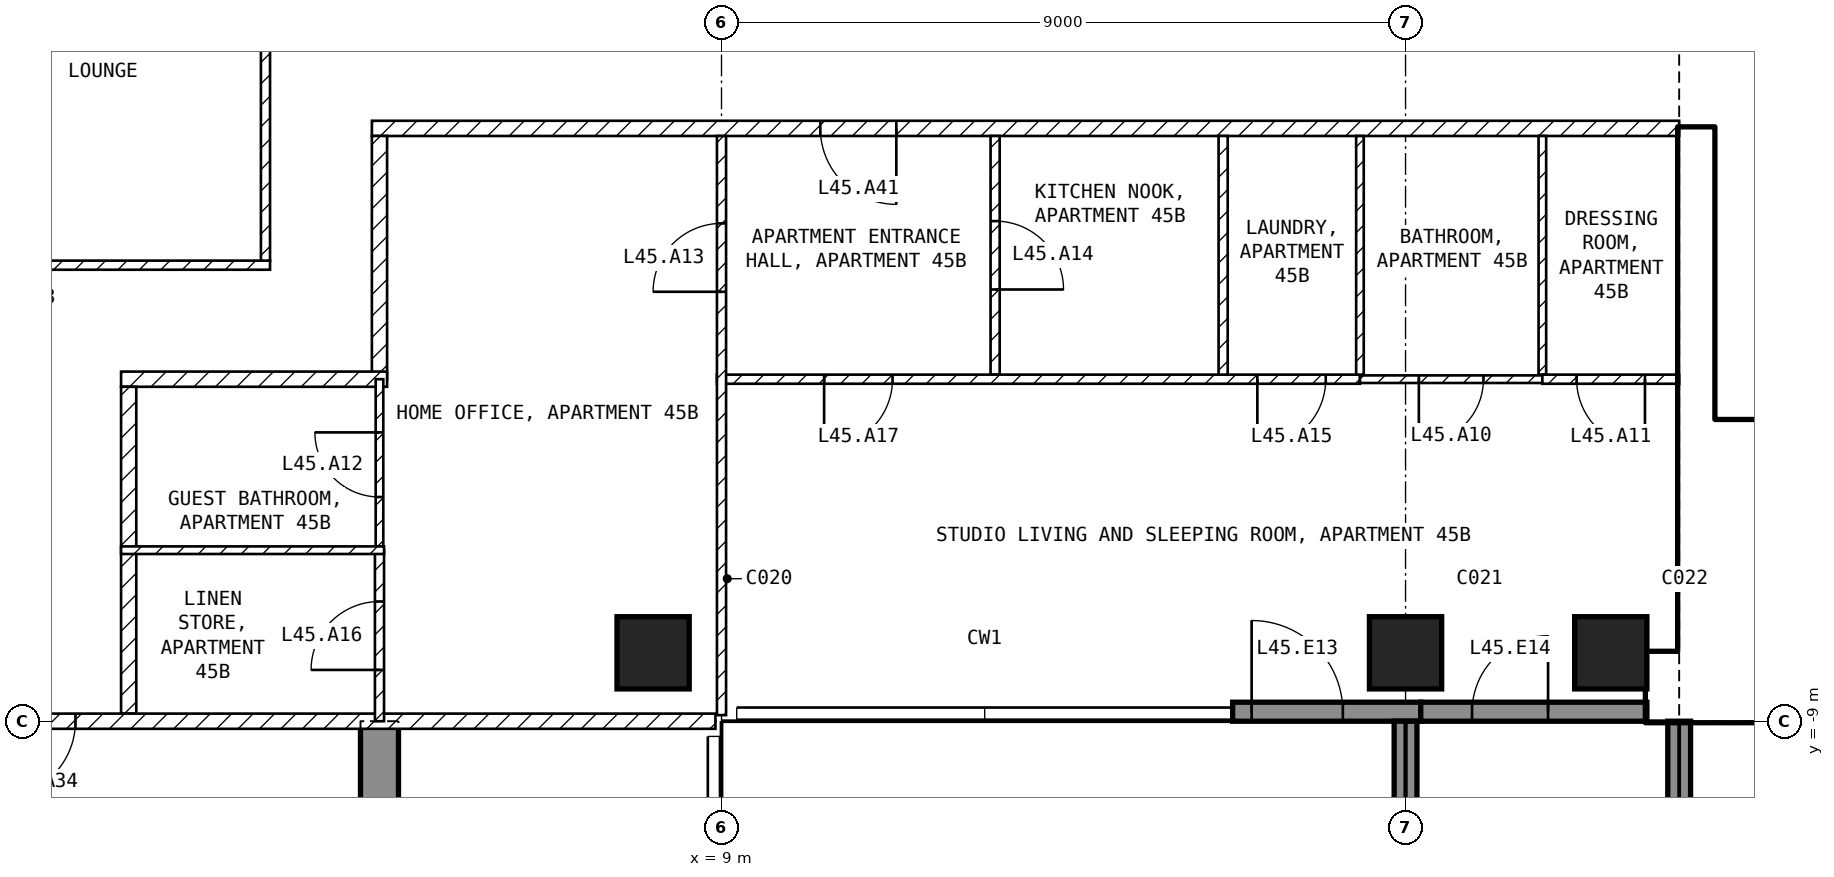
"""IFC4 building model, lengths in metres.
Left out: names, types, materials, properties, quantities, classifications, styles, units other than length and angle.
Written with IfcOpenShell. Run it as: python <this file> out.ifc"""

import sys

from ifc_helpers import new_model, si_unit, direction, frame, frame_2d, origin, origin_2d, place, context, subcontext, project, spatial, polyline, rectangle, outline, extrude, element, fill, save


model = new_model("IFC4")
c1 = context("Model", 3, precision=1e-05, world=origin(), true_north=direction((0.0, 1.0)))
c2 = subcontext(c1, "Body", "Model", "MODEL_VIEW")
j1 = project(units=[si_unit("LENGTHUNIT", "METRE"), si_unit("PLANEANGLEUNIT", "RADIAN")], contexts=[c1])
p1 = place(None, origin())
s1 = spatial("IfcSite", under=j1, at=p1, CompositionType="ELEMENT")
p2 = place(p1, origin())
s2 = spatial("IfcBuilding", under=s1, at=p2, CompositionType="ELEMENT")
p3 = place(p2, frame((0.0, 0.0, 184.1)))
s3 = spatial("IfcBuildingStorey", under=s2, at=p3, CompositionType="ELEMENT", Elevation=184.1)
for number, where, z_axis, x_axis in (
    (1, (8.1, -8.1, -0.25), (0.0, 0.0, 1.0), (1.0, 0.0, 0.0)),
    (2, (18.0, -8.1, -0.25), (0.0, 0.0, 1.0), (1.0, 0.0, 0.0)),
    (3, (20.7, -8.1, -0.25), (0.0, 0.0, 1.0), (1.0, 0.0, 0.0)),
):
    element("IfcColumn", number, at=place(p3, frame(where, z_axis=z_axis, x_axis=x_axis)), inside=s3, PredefinedType="COLUMN", context=c2, shape_type="SweptSolid", body=[
        extrude(rectangle(XDim=0.95, YDim=0.95, at=origin_2d()), origin(), (0.0, 0.0, 1.0), 3.5),
    ])
p4 = place(p3, frame((4.25, -20.225, -0.25), z_axis=(1.0, 0.0, 0.0), x_axis=(0.0, 1.0, 0.0)))
e4 = element("IfcWall", 4, at=p4, inside=s3, PredefinedType="SHEAR", context=c2, shape_type="SweptSolid", body=[
    extrude(outline(polyline([(0.0, 0.0), (6.725, 0.0), (6.725, 2.65), (9.125, 2.65), (9.125, 0.0), (11.225, 0.0), (11.225, 3.5), (0.0, 3.5), (0.0, 0.0)])), origin(), (0.0, 0.0, 1.0), 0.5),
])
p5 = place(p3, frame((15.725, -8.875, 0.0), z_axis=(0.0, 0.0, 1.0), x_axis=(1.0, 0.0, 0.0)))
e5 = element("IfcWall", 5, at=p5, inside=s3, PredefinedType="SOLIDWALL", context=c2, shape_type="SweptSolid", body=[
    extrude(rectangle(XDim=2.475, YDim=0.25, at=frame_2d((1.237, 0.0))), origin(), (0.0, 0.0, 1.0), 3.25),
])
p6 = place(p5, frame((0.25, 0.0, 0.0)))
e6 = element("IfcOpeningElement", 6, at=p6, cuts=e5, PredefinedType="OPENING", context=c2, shape_type="SweptSolid", body=[
    extrude(rectangle(XDim=1.2, YDim=2.4, at=frame_2d((0.6, 1.2))), frame((0.0, 0.135, 0.0), z_axis=(0.0, -1.0, 0.0), x_axis=(1.0, 0.0, 0.0)), (0.0, 0.0, 1.0), 0.27),
])
p7 = place(p3, frame((18.2, -8.875, 0.0), z_axis=(0.0, 0.0, 1.0), x_axis=(1.0, 0.0, 0.0)))
e7 = element("IfcWall", 7, at=p7, inside=s3, PredefinedType="SOLIDWALL", context=c2, shape_type="SweptSolid", body=[
    extrude(rectangle(XDim=2.975, YDim=0.25, at=frame_2d((1.488, 0.0))), origin(), (0.0, 0.0, 1.0), 3.25),
])
p8 = place(p7, frame((0.675, 0.0, 0.0)))
e8 = element("IfcOpeningElement", 8, at=p8, cuts=e7, PredefinedType="OPENING", context=c2, shape_type="SweptSolid", body=[
    extrude(rectangle(XDim=1.0, YDim=2.4, at=frame_2d((0.5, 1.2))), frame((0.0, 0.135, 0.0), z_axis=(0.0, -1.0, 0.0), x_axis=(1.0, 0.0, 0.0)), (0.0, 0.0, 1.0), 0.27),
])
for number, where, z_axis, x_axis in (
    (9, (18.0, -9.0, 0.0), (0.0, 0.0, 1.0), (0.0, -1.0, 0.0)),
    (10, (21.6, -9.0, 0.0), (0.0, 0.0, 1.0), (0.0, -1.0, 0.0)),
):
    element("IfcWall", number, at=place(p3, frame(where, z_axis=z_axis, x_axis=x_axis)), inside=s3, PredefinedType="SOLIDWALL", context=c2, shape_type="SweptSolid", body=[
        extrude(rectangle(XDim=2.7, YDim=0.3, at=frame_2d((1.35, 0.0))), origin(), (0.0, 0.0, 1.0), 3.25),
    ])
p9 = place(p3, frame((21.175, -8.55, 0.0), z_axis=(0.0, 0.0, 1.0), x_axis=(1.0, 0.0, 0.0)))
e11 = element("IfcWall", 11, at=p9, inside=s3, PredefinedType="SHEAR", context=c2, shape_type="SweptSolid", body=[
    extrude(rectangle(XDim=9.025, YDim=0.9, at=frame_2d((4.512, 0.0))), origin(), (0.0, 0.0, 1.0), 3.25),
])
p10 = place(p3, frame((21.825, -8.1, 0.0), z_axis=(0.0, 0.0, 1.0), x_axis=(0.0, 1.0, 0.0)))
e12 = element("IfcWall", 12, at=p10, inside=s3, PredefinedType="SHEAR", context=c2, shape_type="SweptSolid", body=[
    extrude(rectangle(XDim=6.9, YDim=0.45, at=frame_2d((3.45, 0.0))), origin(), (0.0, 0.0, 1.0), 3.25),
])
p11 = place(p3, frame((22.05, -5.15, 0.0), z_axis=(0.0, 0.0, 1.0), x_axis=(1.0, 0.0, 0.0)))
e13 = element("IfcWall", 13, at=p11, inside=s3, PredefinedType="SOLIDWALL", context=c2, shape_type="SweptSolid", body=[
    extrude(rectangle(XDim=6.3, YDim=0.2, at=frame_2d((3.15, 0.0))), origin(), (0.0, 0.0, 1.0), 3.25),
])
p12 = place(p11, frame((0.2, 0.0, 0.0)))
e14 = element("IfcOpeningElement", 14, at=p12, cuts=e13, PredefinedType="OPENING", context=c2, shape_type="SweptSolid", body=[
    extrude(rectangle(XDim=1.0, YDim=2.1, at=frame_2d((0.5, 1.05))), frame((0.0, 0.11, 0.0), z_axis=(0.0, -1.0, 0.0), x_axis=(1.0, 0.0, 0.0)), (0.0, 0.0, 1.0), 0.22),
])
p13 = place(p3, frame((-3.06, -3.0, 0.0), z_axis=(0.0, 0.0, 1.0), x_axis=(1.0, 0.0, 0.0)))
e15 = element("IfcWall", 15, at=p13, inside=s3, PredefinedType="PARTITIONING", context=c2, shape_type="SweptSolid", body=[
    extrude(rectangle(XDim=6.12, YDim=0.12, at=frame_2d((3.06, 0.0))), origin(), (0.0, 0.0, 1.0), 3.25),
])
p14 = place(p3, frame((3.0, -2.94, 0.0), z_axis=(0.0, 0.0, 1.0), x_axis=(0.0, 1.0, 0.0)))
e16 = element("IfcWall", 16, at=p14, inside=s3, PredefinedType="PARTITIONING", context=c2, shape_type="SweptSolid", body=[
    extrude(rectangle(XDim=5.88, YDim=0.12, at=frame_2d((2.94, 0.0))), origin(), (0.0, 0.0, 1.0), 3.25),
])
p15 = place(p3, frame((21.6, -1.2, 0.0), z_axis=(0.0, 0.0, 1.0), x_axis=(-1.0, 0.0, 0.0)))
e17 = element("IfcWall", 17, at=p15, inside=s3, PredefinedType="PARTITIONING", context=c2, shape_type="SweptSolid", body=[
    extrude(rectangle(XDim=17.2, YDim=0.2, at=frame_2d((8.6, 0.0))), origin(), (0.0, 0.0, 1.0), 3.25),
])
p16 = place(p15, frame((10.3, 0.0, 0.0)))
e18 = element("IfcOpeningElement", 18, at=p16, cuts=e17, PredefinedType="OPENING", context=c2, shape_type="SweptSolid", body=[
    extrude(rectangle(XDim=1.0, YDim=2.1, at=frame_2d((0.5, 1.05))), frame((0.0, 0.11, 0.0), z_axis=(0.0, -1.0, 0.0), x_axis=(1.0, 0.0, 0.0)), (0.0, 0.0, 1.0), 0.22),
])
p17 = place(p3, frame((4.5, -1.3, 0.0), z_axis=(0.0, 0.0, 1.0), x_axis=(0.0, -1.0, 0.0)))
e19 = element("IfcWall", 19, at=p17, inside=s3, PredefinedType="PARTITIONING", context=c2, shape_type="SweptSolid", body=[
    extrude(rectangle(XDim=3.2, YDim=0.2, at=frame_2d((1.6, 0.0))), origin(), (0.0, 0.0, 1.0), 3.25),
])
p18 = place(p3, frame((4.6, -4.5, 0.0), z_axis=(0.0, 0.0, 1.0), x_axis=(-1.0, 0.0, 0.0)))
e20 = element("IfcWall", 20, at=p18, inside=s3, PredefinedType="PARTITIONING", context=c2, shape_type="SweptSolid", body=[
    extrude(rectangle(XDim=3.5, YDim=0.2, at=frame_2d((1.75, 0.0))), origin(), (0.0, 0.0, 1.0), 3.25),
])
p19 = place(p3, frame((1.2, -4.6, 0.0), z_axis=(0.0, 0.0, 1.0), x_axis=(0.0, -1.0, 0.0)))
e21 = element("IfcWall", 21, at=p19, inside=s3, PredefinedType="PARTITIONING", context=c2, shape_type="SweptSolid", body=[
    extrude(rectangle(XDim=4.3, YDim=0.2, at=frame_2d((2.15, 0.0))), origin(), (0.0, 0.0, 1.0), 3.25),
])
p20 = place(p3, frame((8.92, -9.0, 0.0), z_axis=(0.0, 0.0, 1.0), x_axis=(-1.0, 0.0, 0.0)))
e22 = element("IfcWall", 22, at=p20, inside=s3, PredefinedType="PARTITIONING", context=c2, shape_type="SweptSolid", body=[
    extrude(rectangle(XDim=17.84, YDim=0.2, at=frame_2d((8.92, 0.0))), origin(), (0.0, 0.0, 1.0), 3.25),
])
p21 = place(p20, frame((8.42, 0.0, 0.0)))
e23 = element("IfcOpeningElement", 23, at=p21, cuts=e22, PredefinedType="OPENING", context=c2, shape_type="SweptSolid", body=[
    extrude(rectangle(XDim=1.0, YDim=2.1, at=frame_2d((0.5, 1.05))), frame((0.0, 0.11, 0.0), z_axis=(0.0, -1.0, 0.0), x_axis=(1.0, 0.0, 0.0)), (0.0, 0.0, 1.0), 0.22),
])
p22 = place(p3, frame((12.6, -1.3, 0.0), z_axis=(0.0, 0.0, 1.0), x_axis=(0.0, -1.0, 0.0)))
e24 = element("IfcWall", 24, at=p22, inside=s3, PredefinedType="PARTITIONING", context=c2, shape_type="SweptSolid", body=[
    extrude(rectangle(XDim=3.14, YDim=0.12, at=frame_2d((1.57, 0.0))), origin(), (0.0, 0.0, 1.0), 3.25),
])
p23 = place(p22, frame((1.12, 0.0, 0.0)))
e25 = element("IfcOpeningElement", 25, at=p23, cuts=e24, PredefinedType="OPENING", context=c2, shape_type="SweptSolid", body=[
    extrude(rectangle(XDim=0.9, YDim=2.1, at=frame_2d((0.45, 1.05))), frame((0.0, 0.07, 0.0), z_axis=(0.0, -1.0, 0.0), x_axis=(1.0, 0.0, 0.0)), (0.0, 0.0, 1.0), 0.14),
])
p24 = place(p3, frame((17.4, -4.5, 0.0), z_axis=(0.0, 0.0, 1.0), x_axis=(-1.0, 0.0, 0.0)))
e26 = element("IfcWall", 26, at=p24, inside=s3, PredefinedType="PARTITIONING", context=c2, shape_type="SweptSolid", body=[
    extrude(rectangle(XDim=8.46, YDim=0.12, at=frame_2d((4.23, 0.0))), origin(), (0.0, 0.0, 1.0), 3.25),
])
p25 = place(p24, frame((0.45, 0.0, 0.0)))
e27 = element("IfcOpeningElement", 27, at=p25, cuts=e26, PredefinedType="OPENING", context=c2, shape_type="SweptSolid", body=[
    extrude(rectangle(XDim=0.9, YDim=2.1, at=frame_2d((0.45, 1.05))), frame((0.0, 0.07, 0.0), z_axis=(0.0, -1.0, 0.0), x_axis=(1.0, 0.0, 0.0)), (0.0, 0.0, 1.0), 0.14),
])
p26 = place(p24, frame((6.15, 0.0, 0.0)))
e28 = element("IfcOpeningElement", 28, at=p26, cuts=e26, PredefinedType="OPENING", context=c2, shape_type="SweptSolid", body=[
    extrude(rectangle(XDim=0.9, YDim=2.1, at=frame_2d((0.45, 1.05))), frame((0.0, 0.07, 0.0), z_axis=(0.0, -1.0, 0.0), x_axis=(1.0, 0.0, 0.0)), (0.0, 0.0, 1.0), 0.14),
])
p27 = place(p3, frame((9.0, -8.92, 0.0), z_axis=(0.0, 0.0, 1.0), x_axis=(0.0, 1.0, 0.0)))
e29 = element("IfcWall", 29, at=p27, inside=s3, PredefinedType="PARTITIONING", context=c2, shape_type="SweptSolid", body=[
    extrude(rectangle(XDim=7.62, YDim=0.12, at=frame_2d((3.81, 0.0))), origin(), (0.0, 0.0, 1.0), 3.25),
])
p28 = place(p27, frame((5.57, 0.0, 0.0)))
e30 = element("IfcOpeningElement", 30, at=p28, cuts=e29, PredefinedType="OPENING", context=c2, shape_type="SweptSolid", body=[
    extrude(rectangle(XDim=0.9, YDim=2.1, at=frame_2d((0.45, 1.05))), frame((0.0, 0.07, 0.0), z_axis=(0.0, -1.0, 0.0), x_axis=(1.0, 0.0, 0.0)), (0.0, 0.0, 1.0), 0.14),
])
p29 = place(p3, frame((15.6, -1.3, 0.0), z_axis=(0.0, 0.0, 1.0), x_axis=(0.0, -1.0, 0.0)))
e31 = element("IfcWall", 31, at=p29, inside=s3, PredefinedType="PARTITIONING", context=c2, shape_type="SweptSolid", body=[
    extrude(rectangle(XDim=3.14, YDim=0.12, at=frame_2d((1.57, 0.0))), origin(), (0.0, 0.0, 1.0), 3.25),
])
for number, where, z_axis, x_axis in (
    (32, (17.4, -1.3, 0.0), (0.0, 0.0, 1.0), (0.0, -1.0, 0.0)),
    (33, (19.8, -1.3, 0.0), (0.0, 0.0, 1.0), (0.0, -1.0, 0.0)),
):
    element("IfcWall", number, at=place(p3, frame(where, z_axis=z_axis, x_axis=x_axis)), inside=s3, PredefinedType="PARTITIONING", context=c2, shape_type="SweptSolid", body=[
        extrude(rectangle(XDim=3.14, YDim=0.1, at=frame_2d((1.57, 0.0))), origin(), (0.0, 0.0, 1.0), 3.25),
    ])
p30 = place(p3, frame((19.8, -4.5, 0.0), z_axis=(0.0, 0.0, 1.0), x_axis=(-1.0, 0.0, 0.0)))
e34 = element("IfcWall", 34, at=p30, inside=s3, PredefinedType="PARTITIONING", context=c2, shape_type="SweptSolid", body=[
    extrude(rectangle(XDim=2.4, YDim=0.1, at=frame_2d((1.2, 0.0))), origin(), (0.0, 0.0, 1.0), 3.25),
])
p31 = place(p30, frame((0.775, 0.0, 0.0)))
e35 = element("IfcOpeningElement", 35, at=p31, cuts=e34, PredefinedType="OPENING", context=c2, shape_type="SweptSolid", body=[
    extrude(rectangle(XDim=0.85, YDim=2.1, at=frame_2d((0.425, 1.05))), frame((0.0, 0.06, 0.0), z_axis=(0.0, -1.0, 0.0), x_axis=(1.0, 0.0, 0.0)), (0.0, 0.0, 1.0), 0.12),
])
p32 = place(p3, frame((21.6, -4.5, 0.0), z_axis=(0.0, 0.0, 1.0), x_axis=(-1.0, 0.0, 0.0)))
e36 = element("IfcWall", 36, at=p32, inside=s3, PredefinedType="PARTITIONING", context=c2, shape_type="SweptSolid", body=[
    extrude(rectangle(XDim=1.8, YDim=0.12, at=frame_2d((0.9, 0.0))), origin(), (0.0, 0.0, 1.0), 3.25),
])
p33 = place(p32, frame((0.45, 0.0, 0.0)))
e37 = element("IfcOpeningElement", 37, at=p33, cuts=e36, PredefinedType="OPENING", context=c2, shape_type="SweptSolid", body=[
    extrude(rectangle(XDim=0.9, YDim=2.1, at=frame_2d((0.45, 1.05))), frame((0.0, 0.07, 0.0), z_axis=(0.0, -1.0, 0.0), x_axis=(1.0, 0.0, 0.0)), (0.0, 0.0, 1.0), 0.14),
])
p34 = place(p3, frame((4.5, -6.75, 0.0), z_axis=(0.0, 0.0, 1.0), x_axis=(0.0, 1.0, 0.0)))
e38 = element("IfcWall", 38, at=p34, inside=s3, PredefinedType="PARTITIONING", context=c2, shape_type="SweptSolid", body=[
    extrude(rectangle(XDim=2.25, YDim=0.1, at=frame_2d((1.125, 0.0))), origin(), (0.0, 0.0, 1.0), 3.25),
])
p35 = place(p34, frame((0.7, 0.0, 0.0)))
e39 = element("IfcOpeningElement", 39, at=p35, cuts=e38, PredefinedType="OPENING", context=c2, shape_type="SweptSolid", body=[
    extrude(rectangle(XDim=0.85, YDim=2.1, at=frame_2d((0.425, 1.05))), frame((0.0, 0.06, 0.0), z_axis=(0.0, -1.0, 0.0), x_axis=(1.0, 0.0, 0.0)), (0.0, 0.0, 1.0), 0.12),
])
p36 = place(p3, frame((4.5, -9.0, 0.0), z_axis=(0.0, 0.0, 1.0), x_axis=(0.0, 1.0, 0.0)))
e40 = element("IfcWall", 40, at=p36, inside=s3, PredefinedType="PARTITIONING", context=c2, shape_type="SweptSolid", body=[
    extrude(rectangle(XDim=2.25, YDim=0.12, at=frame_2d((1.125, 0.0))), origin(), (0.0, 0.0, 1.0), 3.25),
])
p37 = place(p36, frame((0.675, 0.0, 0.0)))
e41 = element("IfcOpeningElement", 41, at=p37, cuts=e40, PredefinedType="OPENING", context=c2, shape_type="SweptSolid", body=[
    extrude(rectangle(XDim=0.9, YDim=2.1, at=frame_2d((0.45, 1.05))), frame((0.0, 0.07, 0.0), z_axis=(0.0, -1.0, 0.0), x_axis=(1.0, 0.0, 0.0)), (0.0, 0.0, 1.0), 0.14),
])
p38 = place(p3, frame((4.56, -6.75, 0.0), z_axis=(0.0, 0.0, 1.0), x_axis=(-1.0, 0.0, 0.0)))
e42 = element("IfcWall", 42, at=p38, inside=s3, PredefinedType="PARTITIONING", context=c2, shape_type="SweptSolid", body=[
    extrude(rectangle(XDim=3.46, YDim=0.1, at=frame_2d((1.73, 0.0))), origin(), (0.0, 0.0, 1.0), 3.25),
])
p39 = place(p6, origin())
e43 = element("IfcDoor", 43, at=p39, inside=s3, OperationType="SINGLE_SWING_LEFT", PredefinedType="DOOR", context=c2, shape_type="SweptSolid", body=[
    extrude(rectangle(XDim=1.2, YDim=2.4, at=frame_2d((0.6, 1.2))), frame((0.0, 0.025, 0.0), z_axis=(0.0, -1.0, 0.0), x_axis=(1.0, 0.0, 0.0)), (0.0, 0.0, 1.0), 0.05),
])
fill(e6, e43)
p40 = place(p8, origin())
e44 = element("IfcDoor", 44, at=p40, inside=s3, OperationType="SINGLE_SWING_RIGHT", PredefinedType="DOOR", context=c2, shape_type="SweptSolid", body=[
    extrude(rectangle(XDim=1.0, YDim=2.4, at=frame_2d((0.5, 1.2))), frame((0.0, 0.025, 0.0), z_axis=(0.0, -1.0, 0.0), x_axis=(1.0, 0.0, 0.0)), (0.0, 0.0, 1.0), 0.05),
])
fill(e8, e44)
p41 = place(p12, origin())
e45 = element("IfcDoor", 45, at=p41, inside=s3, OperationType="SINGLE_SWING_LEFT", PredefinedType="DOOR", context=c2, shape_type="SweptSolid", body=[
    extrude(rectangle(XDim=1.0, YDim=2.1, at=frame_2d((0.5, 1.05))), frame((0.0, 0.025, 0.0), z_axis=(0.0, -1.0, 0.0), x_axis=(1.0, 0.0, 0.0)), (0.0, 0.0, 1.0), 0.05),
])
fill(e14, e45)
p42 = place(p31, origin())
e46 = element("IfcDoor", 46, at=p42, inside=s3, OperationType="SINGLE_SWING_RIGHT", PredefinedType="DOOR", context=c2, shape_type="SweptSolid", body=[
    extrude(rectangle(XDim=0.85, YDim=2.1, at=frame_2d((0.425, 1.05))), frame((0.0, 0.025, 0.0), z_axis=(0.0, -1.0, 0.0), x_axis=(1.0, 0.0, 0.0)), (0.0, 0.0, 1.0), 0.05),
])
fill(e35, e46)
p43 = place(p33, origin())
e47 = element("IfcDoor", 47, at=p43, inside=s3, OperationType="SINGLE_SWING_LEFT", PredefinedType="DOOR", context=c2, shape_type="SweptSolid", body=[
    extrude(rectangle(XDim=0.9, YDim=2.1, at=frame_2d((0.45, 1.05))), frame((0.0, 0.025, 0.0), z_axis=(0.0, -1.0, 0.0), x_axis=(1.0, 0.0, 0.0)), (0.0, 0.0, 1.0), 0.05),
])
fill(e37, e47)
p44 = place(p35, origin())
e48 = element("IfcDoor", 48, at=p44, inside=s3, OperationType="SINGLE_SWING_RIGHT", PredefinedType="DOOR", context=c2, shape_type="SweptSolid", body=[
    extrude(rectangle(XDim=0.85, YDim=2.1, at=frame_2d((0.425, 1.05))), frame((0.0, 0.025, 0.0), z_axis=(0.0, -1.0, 0.0), x_axis=(1.0, 0.0, 0.0)), (0.0, 0.0, 1.0), 0.05),
])
fill(e39, e48)
p45 = place(p28, origin())
e49 = element("IfcDoor", 49, at=p45, inside=s3, OperationType="SINGLE_SWING_LEFT", PredefinedType="DOOR", context=c2, shape_type="SweptSolid", body=[
    extrude(rectangle(XDim=0.9, YDim=2.1, at=frame_2d((0.45, 1.05))), frame((0.0, 0.025, 0.0), z_axis=(0.0, -1.0, 0.0), x_axis=(1.0, 0.0, 0.0)), (0.0, 0.0, 1.0), 0.05),
])
fill(e30, e49)
p46 = place(p23, origin())
e50 = element("IfcDoor", 50, at=p46, inside=s3, OperationType="SINGLE_SWING_RIGHT", PredefinedType="DOOR", context=c2, shape_type="SweptSolid", body=[
    extrude(rectangle(XDim=0.9, YDim=2.1, at=frame_2d((0.45, 1.05))), frame((0.0, 0.025, 0.0), z_axis=(0.0, -1.0, 0.0), x_axis=(1.0, 0.0, 0.0)), (0.0, 0.0, 1.0), 0.05),
])
fill(e25, e50)
p47 = place(p25, origin())
e51 = element("IfcDoor", 51, at=p47, inside=s3, OperationType="SINGLE_SWING_RIGHT", PredefinedType="DOOR", context=c2, shape_type="SweptSolid", body=[
    extrude(rectangle(XDim=0.9, YDim=2.1, at=frame_2d((0.45, 1.05))), frame((0.0, 0.025, 0.0), z_axis=(0.0, -1.0, 0.0), x_axis=(1.0, 0.0, 0.0)), (0.0, 0.0, 1.0), 0.05),
])
fill(e27, e51)
p48 = place(p37, origin())
e52 = element("IfcDoor", 52, at=p48, inside=s3, OperationType="SINGLE_SWING_LEFT", PredefinedType="DOOR", context=c2, shape_type="SweptSolid", body=[
    extrude(rectangle(XDim=0.9, YDim=2.1, at=frame_2d((0.45, 1.05))), frame((0.0, 0.025, 0.0), z_axis=(0.0, -1.0, 0.0), x_axis=(1.0, 0.0, 0.0)), (0.0, 0.0, 1.0), 0.05),
])
fill(e41, e52)
p49 = place(p26, origin())
e53 = element("IfcDoor", 53, at=p49, inside=s3, OperationType="SINGLE_SWING_RIGHT", PredefinedType="DOOR", context=c2, shape_type="SweptSolid", body=[
    extrude(rectangle(XDim=0.9, YDim=2.1, at=frame_2d((0.45, 1.05))), frame((0.0, 0.025, 0.0), z_axis=(0.0, -1.0, 0.0), x_axis=(1.0, 0.0, 0.0)), (0.0, 0.0, 1.0), 0.05),
])
fill(e28, e53)
p50 = place(p21, origin())
e54 = element("IfcDoor", 54, at=p50, inside=s3, OperationType="SINGLE_SWING_RIGHT", PredefinedType="DOOR", context=c2, shape_type="SweptSolid", body=[
    extrude(rectangle(XDim=1.0, YDim=2.1, at=frame_2d((0.5, 1.05))), frame((0.0, 0.025, 0.0), z_axis=(0.0, -1.0, 0.0), x_axis=(1.0, 0.0, 0.0)), (0.0, 0.0, 1.0), 0.05),
])
fill(e23, e54)
p51 = place(p16, origin())
e55 = element("IfcDoor", 55, at=p51, inside=s3, OperationType="SINGLE_SWING_LEFT", PredefinedType="DOOR", context=c2, shape_type="SweptSolid", body=[
    extrude(rectangle(XDim=1.0, YDim=2.1, at=frame_2d((0.5, 1.05))), frame((0.0, 0.025, 0.0), z_axis=(0.0, -1.0, 0.0), x_axis=(1.0, 0.0, 0.0)), (0.0, 0.0, 1.0), 0.05),
])
fill(e18, e55)
save(model, sys.argv[1])
